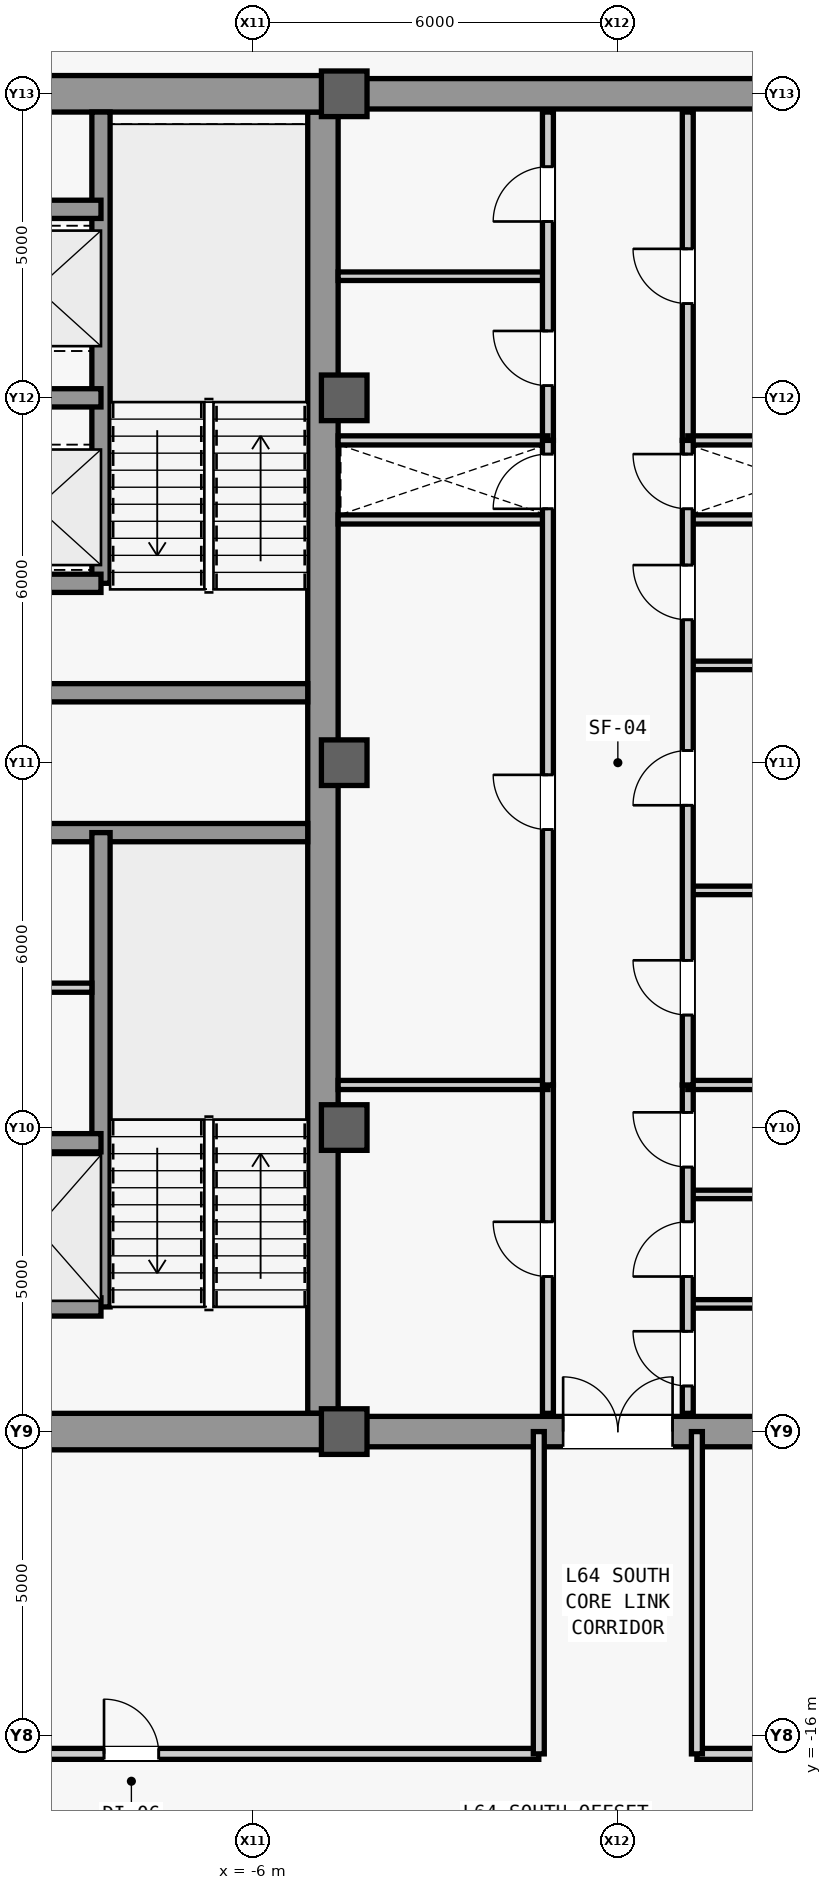
"""IFC4 building model, lengths in metres.
Left out: names, types, materials, properties, quantities, classifications, styles, units other than length and angle.
Written with IfcOpenShell. Run it as: python <this file> out.ifc"""

import sys

from ifc_helpers import new_model, si_unit, direction, frame, frame_2d, origin, origin_2d, place, context, subcontext, project, spatial, rectangle, extrude, source, transform, mapped, element, fill, save


model = new_model("IFC4")
c1 = context("Model", 3, precision=1e-05, world=origin(), true_north=direction((0.0, 1.0)))
c2 = subcontext(c1, "Body", "Model", "MODEL_VIEW")
j1 = project(units=[si_unit("LENGTHUNIT", "METRE"), si_unit("PLANEANGLEUNIT", "RADIAN")], contexts=[c1])
p1 = place(None, origin())
s1 = spatial("IfcSite", under=j1, at=p1, CompositionType="ELEMENT")
p2 = place(p1, origin())
s2 = spatial("IfcBuilding", under=s1, at=p2, CompositionType="ELEMENT")
p3 = place(p2, frame((0.0, 0.0, 273.5)))
s3 = spatial("IfcBuildingStorey", under=s2, at=p3, CompositionType="ELEMENT", Elevation=273.5)
m1 = source(origin(), c2, "Body", "SweptSolid", [
    extrude(rectangle(XDim=21.4, YDim=0.5, at=frame_2d((10.7, 0.0))), origin(), (0.0, 0.0, 1.0), 3.78),
])
p4 = place(p3, frame((-4.85, -10.7, 0.0), z_axis=(0.0, 0.0, 1.0), x_axis=(0.0, 1.0, 0.0)))
e1 = element("IfcWall", 1, at=p4, inside=s3, PredefinedType="SHEAR", context=c2, shape_type="MappedRepresentation", body=[
    mapped(m1, transform((0.0, 0.0, 0.0), scale=1.0)),
])
m2 = source(origin(), c2, "Body", "SweptSolid", [
    extrude(rectangle(XDim=5.9, YDim=0.6, at=frame_2d((2.95, 0.0))), origin(), (0.0, 0.0, 1.0), 3.78),
])
for number, where, z_axis, x_axis in (
    (2, (-10.75, -11.0, 0.0), (0.0, 0.0, 1.0), (1.0, 0.0, 0.0)),
    (3, (-10.75, 11.0, 0.0), (0.0, 0.0, 1.0), (1.0, 0.0, 0.0)),
):
    element("IfcWall", number, at=place(p3, frame(where, z_axis=z_axis, x_axis=x_axis)), inside=s3, PredefinedType="SHEAR", context=c2, shape_type="MappedRepresentation", body=[
        mapped(m2, transform((0.0, 0.0, 0.0), scale=1.0)),
    ])
m3 = source(origin(), c2, "Body", "SweptSolid", [
    extrude(rectangle(XDim=5.65, YDim=0.3, at=frame_2d((2.825, 0.0))), origin(), (0.0, 0.0, 1.0), 3.78),
])
for number, where, z_axis, x_axis in (
    (4, (-10.75, -1.15, 0.0), (0.0, 0.0, 1.0), (1.0, 0.0, 0.0)),
    (5, (-10.75, 1.15, 0.0), (0.0, 0.0, 1.0), (1.0, 0.0, 0.0)),
):
    element("IfcWall", number, at=place(p3, frame(where, z_axis=z_axis, x_axis=x_axis)), inside=s3, PredefinedType="SHEAR", context=c2, shape_type="MappedRepresentation", body=[
        mapped(m3, transform((0.0, 0.0, 0.0), scale=1.0)),
    ])
m4 = source(origin(), c2, "Body", "SweptSolid", [
    extrude(rectangle(XDim=9.2, YDim=0.5, at=frame_2d((4.6, 0.0))), origin(), (0.0, 0.0, 1.0), 3.78),
])
p5 = place(p3, frame((-4.6, -11.0, 0.0), z_axis=(0.0, 0.0, 1.0), x_axis=(1.0, 0.0, 0.0)))
e6 = element("IfcWall", 6, at=p5, inside=s3, PredefinedType="SHEAR", context=c2, shape_type="MappedRepresentation", body=[
    mapped(m4, transform((0.0, 0.0, 0.0), scale=1.0)),
])
m5 = source(origin(), c2, "Body", "SweptSolid", [
    extrude(rectangle(XDim=1.8, YDim=2.25, at=frame_2d((0.9, 1.125))), frame((0.0, 0.26, 0.0), z_axis=(0.0, -1.0, 0.0), x_axis=(1.0, 0.0, 0.0)), (0.0, 0.0, 1.0), 0.52),
])
p6 = place(p5, frame((3.7, 0.0, 0.0)))
e7 = element("IfcOpeningElement", 7, at=p6, cuts=e6, PredefinedType="OPENING", context=c2, shape_type="MappedRepresentation", body=[
    mapped(m5, transform((0.0, 0.0, 0.0), scale=1.0)),
])
p7 = place(p3, frame((-4.6, 11.0, 0.0), z_axis=(0.0, 0.0, 1.0), x_axis=(1.0, 0.0, 0.0)))
e8 = element("IfcWall", 8, at=p7, inside=s3, PredefinedType="SHEAR", context=c2, shape_type="MappedRepresentation", body=[
    mapped(m4, transform((0.0, 0.0, 0.0), scale=1.0)),
])
m6 = source(origin(), c2, "Body", "SweptSolid", [
    extrude(rectangle(XDim=0.75, YDim=0.75, at=origin_2d()), origin(), (0.0, 0.0, 1.0), 4.0),
])
for number, where, z_axis, x_axis in (
    (9, (-4.5, -11.0, 0.0), (0.0, 0.0, 1.0), (1.0, 0.0, 0.0)),
    (10, (-4.5, -6.0, 0.0), (0.0, 0.0, 1.0), (1.0, 0.0, 0.0)),
    (11, (-4.5, 0.0, 0.0), (0.0, 0.0, 1.0), (1.0, 0.0, 0.0)),
    (12, (-4.5, 6.0, 0.0), (0.0, 0.0, 1.0), (1.0, 0.0, 0.0)),
    (13, (-4.5, 11.0, 0.0), (0.0, 0.0, 1.0), (1.0, 0.0, 0.0)),
):
    element("IfcColumn", number, at=place(p3, frame(where, z_axis=z_axis, x_axis=x_axis)), inside=s3, PredefinedType="COLUMN", context=c2, shape_type="MappedRepresentation", body=[
        mapped(m6, transform((0.0, 0.0, 0.0), scale=1.0)),
    ])
m7 = source(origin(), c2, "Body", "SweptSolid", [
    extrude(rectangle(XDim=7.8, YDim=0.3, at=frame_2d((3.9, 0.0))), origin(), (0.0, 0.0, 1.0), 3.78),
])
p8 = place(p3, frame((-8.5, -8.95, 0.0), z_axis=(0.0, 0.0, 1.0), x_axis=(0.0, 1.0, 0.0)))
e14 = element("IfcWall", 14, at=p8, inside=s3, PredefinedType="SHEAR", context=c2, shape_type="MappedRepresentation", body=[
    mapped(m7, transform((0.0, 0.0, 0.0), scale=1.0)),
])
m8 = source(origin(), c2, "Body", "SweptSolid", [
    extrude(rectangle(XDim=2.2, YDim=0.3, at=frame_2d((1.1, 0.0))), origin(), (0.0, 0.0, 1.0), 3.78),
])
for number, where, z_axis, x_axis in (
    (15, (-10.7, -8.95, 0.0), (0.0, 0.0, 1.0), (1.0, 0.0, 0.0)),
    (16, (-10.7, -6.25, 0.0), (0.0, 0.0, 1.0), (1.0, 0.0, 0.0)),
):
    element("IfcWall", number, at=place(p3, frame(where, z_axis=z_axis, x_axis=x_axis)), inside=s3, PredefinedType="SHEAR", context=c2, shape_type="MappedRepresentation", body=[
        mapped(m8, transform((0.0, 0.0, 0.0), scale=1.0)),
    ])
m9 = source(origin(), c2, "Body", "SweptSolid", [
    extrude(rectangle(XDim=7.75, YDim=0.3, at=frame_2d((3.875, 0.0))), origin(), (0.0, 0.0, 1.0), 3.78),
])
p9 = place(p3, frame((-8.5, 2.95, 0.0), z_axis=(0.0, 0.0, 1.0), x_axis=(0.0, 1.0, 0.0)))
e17 = element("IfcWall", 17, at=p9, inside=s3, PredefinedType="SHEAR", context=c2, shape_type="MappedRepresentation", body=[
    mapped(m9, transform((0.0, 0.0, 0.0), scale=1.0)),
])
for number, where, z_axis, x_axis in (
    (18, (-10.7, 2.95, 0.0), (0.0, 0.0, 1.0), (1.0, 0.0, 0.0)),
    (19, (-10.7, 6.0, 0.0), (0.0, 0.0, 1.0), (1.0, 0.0, 0.0)),
    (20, (-10.7, 9.1, 0.0), (0.0, 0.0, 1.0), (1.0, 0.0, 0.0)),
):
    element("IfcWall", number, at=place(p3, frame(where, z_axis=z_axis, x_axis=x_axis)), inside=s3, PredefinedType="SHEAR", context=c2, shape_type="MappedRepresentation", body=[
        mapped(m8, transform((0.0, 0.0, 0.0), scale=1.0)),
    ])
m10 = source(origin(), c2, "Body", "SweptSolid", [
    extrude(rectangle(XDim=2.05, YDim=0.15, at=frame_2d((1.025, 0.0))), origin(), (0.0, 0.0, 1.0), 3.78),
])
p10 = place(p3, frame((-10.7, -3.7, 0.0), z_axis=(0.0, 0.0, 1.0), x_axis=(1.0, 0.0, 0.0)))
e21 = element("IfcWall", 21, at=p10, inside=s3, PredefinedType="PARTITIONING", context=c2, shape_type="MappedRepresentation", body=[
    mapped(m10, transform((0.0, 0.0, 0.0), scale=1.0)),
])
m11 = source(origin(), c2, "Body", "SweptSolid", [
    extrude(rectangle(XDim=3.45, YDim=0.15, at=frame_2d((1.725, 0.0))), origin(), (0.0, 0.0, 1.0), 3.78),
])
for number, where, z_axis, x_axis in (
    (22, (-4.6, 4.0, 0.0), (0.0, 0.0, 1.0), (1.0, 0.0, 0.0)),
    (23, (1.15, 4.0, 0.0), (0.0, 0.0, 1.0), (1.0, 0.0, 0.0)),
):
    element("IfcWall", number, at=place(p3, frame(where, z_axis=z_axis, x_axis=x_axis)), inside=s3, PredefinedType="PARTITIONING", context=c2, shape_type="MappedRepresentation", body=[
        mapped(m11, transform((0.0, 0.0, 0.0), scale=1.0)),
    ])
m12 = source(origin(), c2, "Body", "SweptSolid", [
    extrude(rectangle(XDim=5.4, YDim=0.18, at=frame_2d((2.7, 0.0))), origin(), (0.0, 0.0, 1.0), 3.78),
])
p11 = place(p3, frame((-1.15, -10.7, 0.0), z_axis=(0.0, 0.0, 1.0), x_axis=(0.0, 1.0, 0.0)))
e24 = element("IfcWall", 24, at=p11, inside=s3, PredefinedType="PARTITIONING", context=c2, shape_type="MappedRepresentation", body=[
    mapped(m12, transform((0.0, 0.0, 0.0), scale=1.0)),
])
m13 = source(origin(), c2, "Body", "SweptSolid", [
    extrude(rectangle(XDim=0.9, YDim=2.15, at=frame_2d((0.45, 1.075))), frame((0.0, 0.1, 0.0), z_axis=(0.0, -1.0, 0.0), x_axis=(1.0, 0.0, 0.0)), (0.0, 0.0, 1.0), 0.2),
])
p12 = place(p11, frame((2.25, 0.0, 0.0)))
e25 = element("IfcOpeningElement", 25, at=p12, cuts=e24, PredefinedType="OPENING", context=c2, shape_type="MappedRepresentation", body=[
    mapped(m13, transform((0.0, 0.0, 0.0), scale=1.0)),
])
m14 = source(origin(), c2, "Body", "SweptSolid", [
    extrude(rectangle(XDim=3.45, YDim=0.14, at=frame_2d((1.725, 0.0))), origin(), (0.0, 0.0, 1.0), 3.78),
])
for number, where, z_axis, x_axis in (
    (26, (1.15, -8.9, 0.0), (0.0, 0.0, 1.0), (1.0, 0.0, 0.0)),
    (27, (1.15, -7.1, 0.0), (0.0, 0.0, 1.0), (1.0, 0.0, 0.0)),
):
    element("IfcWall", number, at=place(p3, frame(where, z_axis=z_axis, x_axis=x_axis)), inside=s3, PredefinedType="PARTITIONING", context=c2, shape_type="MappedRepresentation", body=[
        mapped(m14, transform((0.0, 0.0, 0.0), scale=1.0)),
    ])
p13 = place(p3, frame((1.15, -10.7, 0.0), z_axis=(0.0, 0.0, 1.0), x_axis=(0.0, 1.0, 0.0)))
e28 = element("IfcWall", 28, at=p13, inside=s3, PredefinedType="PARTITIONING", context=c2, shape_type="MappedRepresentation", body=[
    mapped(m12, transform((0.0, 0.0, 0.0), scale=1.0)),
])
p14 = place(p13, frame((0.45, 0.0, 0.0)))
e29 = element("IfcOpeningElement", 29, at=p14, cuts=e28, PredefinedType="OPENING", context=c2, shape_type="MappedRepresentation", body=[
    mapped(m13, transform((0.0, 0.0, 0.0), scale=1.0)),
])
p15 = place(p13, frame((2.25, 0.0, 0.0)))
e30 = element("IfcOpeningElement", 30, at=p15, cuts=e28, PredefinedType="OPENING", context=c2, shape_type="MappedRepresentation", body=[
    mapped(m13, transform((0.0, 0.0, 0.0), scale=1.0)),
])
p16 = place(p13, frame((4.05, 0.0, 0.0)))
e31 = element("IfcOpeningElement", 31, at=p16, cuts=e28, PredefinedType="OPENING", context=c2, shape_type="MappedRepresentation", body=[
    mapped(m13, transform((0.0, 0.0, 0.0), scale=1.0)),
])
for number, where, z_axis, x_axis in (
    (32, (-4.6, -5.3, 0.0), (0.0, 0.0, 1.0), (1.0, 0.0, 0.0)),
    (33, (1.15, -5.3, 0.0), (0.0, 0.0, 1.0), (1.0, 0.0, 0.0)),
):
    element("IfcWall", number, at=place(p3, frame(where, z_axis=z_axis, x_axis=x_axis)), inside=s3, PredefinedType="PARTITIONING", context=c2, shape_type="MappedRepresentation", body=[
        mapped(m11, transform((0.0, 0.0, 0.0), scale=1.0)),
    ])
p17 = place(p3, frame((-4.6, 8.0, 0.0), z_axis=(0.0, 0.0, 1.0), x_axis=(1.0, 0.0, 0.0)))
e34 = element("IfcWall", 34, at=p17, inside=s3, PredefinedType="PARTITIONING", context=c2, shape_type="MappedRepresentation", body=[
    mapped(m14, transform((0.0, 0.0, 0.0), scale=1.0)),
])
p18 = place(p3, frame((-1.15, 5.3, 0.0), z_axis=(0.0, 0.0, 1.0), x_axis=(0.0, 1.0, 0.0)))
e35 = element("IfcWall", 35, at=p18, inside=s3, PredefinedType="PARTITIONING", context=c2, shape_type="MappedRepresentation", body=[
    mapped(m12, transform((0.0, 0.0, 0.0), scale=1.0)),
])
p19 = place(p18, frame((0.9, 0.0, 0.0)))
e36 = element("IfcOpeningElement", 36, at=p19, cuts=e35, PredefinedType="OPENING", context=c2, shape_type="MappedRepresentation", body=[
    mapped(m13, transform((0.0, 0.0, 0.0), scale=1.0)),
])
p20 = place(p18, frame((3.6, 0.0, 0.0)))
e37 = element("IfcOpeningElement", 37, at=p20, cuts=e35, PredefinedType="OPENING", context=c2, shape_type="MappedRepresentation", body=[
    mapped(m13, transform((0.0, 0.0, 0.0), scale=1.0)),
])
p21 = place(p3, frame((1.15, 5.3, 0.0), z_axis=(0.0, 0.0, 1.0), x_axis=(0.0, 1.0, 0.0)))
e38 = element("IfcWall", 38, at=p21, inside=s3, PredefinedType="PARTITIONING", context=c2, shape_type="MappedRepresentation", body=[
    mapped(m12, transform((0.0, 0.0, 0.0), scale=1.0)),
])
p22 = place(p21, frame((2.25, 0.0, 0.0)))
e39 = element("IfcOpeningElement", 39, at=p22, cuts=e38, PredefinedType="OPENING", context=c2, shape_type="MappedRepresentation", body=[
    mapped(m13, transform((0.0, 0.0, 0.0), scale=1.0)),
])
for number, where, z_axis, x_axis in (
    (40, (-4.6, 5.3, 0.0), (0.0, 0.0, 1.0), (1.0, 0.0, 0.0)),
    (41, (1.15, 5.3, 0.0), (0.0, 0.0, 1.0), (1.0, 0.0, 0.0)),
):
    element("IfcWall", number, at=place(p3, frame(where, z_axis=z_axis, x_axis=x_axis)), inside=s3, PredefinedType="PARTITIONING", context=c2, shape_type="MappedRepresentation", body=[
        mapped(m11, transform((0.0, 0.0, 0.0), scale=1.0)),
    ])
m15 = source(origin(), c2, "Body", "SweptSolid", [
    extrude(rectangle(XDim=10.6, YDim=0.18, at=frame_2d((5.3, 0.0))), origin(), (0.0, 0.0, 1.0), 3.78),
])
p23 = place(p3, frame((-1.15, -5.3, 0.0), z_axis=(0.0, 0.0, 1.0), x_axis=(0.0, 1.0, 0.0)))
e42 = element("IfcWall", 42, at=p23, inside=s3, PredefinedType="PARTITIONING", context=c2, shape_type="MappedRepresentation", body=[
    mapped(m15, transform((0.0, 0.0, 0.0), scale=1.0)),
])
p24 = place(p23, frame((4.2, 0.0, 0.0)))
e43 = element("IfcOpeningElement", 43, at=p24, cuts=e42, PredefinedType="OPENING", context=c2, shape_type="MappedRepresentation", body=[
    mapped(m13, transform((0.0, 0.0, 0.0), scale=1.0)),
])
p25 = place(p23, frame((9.475, 0.0, 0.0)))
e44 = element("IfcOpeningElement", 44, at=p25, cuts=e42, PredefinedType="OPENING", context=c2, shape_type="MappedRepresentation", body=[
    mapped(m13, transform((0.0, 0.0, 0.0), scale=1.0)),
])
for number, where, z_axis, x_axis in (
    (45, (1.15, -2.1, 0.0), (0.0, 0.0, 1.0), (1.0, 0.0, 0.0)),
    (46, (1.15, 1.6, 0.0), (0.0, 0.0, 1.0), (1.0, 0.0, 0.0)),
):
    element("IfcWall", number, at=place(p3, frame(where, z_axis=z_axis, x_axis=x_axis)), inside=s3, PredefinedType="PARTITIONING", context=c2, shape_type="MappedRepresentation", body=[
        mapped(m14, transform((0.0, 0.0, 0.0), scale=1.0)),
    ])
p26 = place(p3, frame((1.15, -5.3, 0.0), z_axis=(0.0, 0.0, 1.0), x_axis=(0.0, 1.0, 0.0)))
e47 = element("IfcWall", 47, at=p26, inside=s3, PredefinedType="PARTITIONING", context=c2, shape_type="MappedRepresentation", body=[
    mapped(m15, transform((0.0, 0.0, 0.0), scale=1.0)),
])
p27 = place(p26, frame((1.15, 0.0, 0.0)))
e48 = element("IfcOpeningElement", 48, at=p27, cuts=e47, PredefinedType="OPENING", context=c2, shape_type="MappedRepresentation", body=[
    mapped(m13, transform((0.0, 0.0, 0.0), scale=1.0)),
])
p28 = place(p26, frame((4.6, 0.0, 0.0)))
e49 = element("IfcOpeningElement", 49, at=p28, cuts=e47, PredefinedType="OPENING", context=c2, shape_type="MappedRepresentation", body=[
    mapped(m13, transform((0.0, 0.0, 0.0), scale=1.0)),
])
p29 = place(p26, frame((7.65, 0.0, 0.0)))
e50 = element("IfcOpeningElement", 50, at=p29, cuts=e47, PredefinedType="OPENING", context=c2, shape_type="MappedRepresentation", body=[
    mapped(m13, transform((0.0, 0.0, 0.0), scale=1.0)),
])
p30 = place(p26, frame((9.475, 0.0, 0.0)))
e51 = element("IfcOpeningElement", 51, at=p30, cuts=e47, PredefinedType="OPENING", context=c2, shape_type="MappedRepresentation", body=[
    mapped(m13, transform((0.0, 0.0, 0.0), scale=1.0)),
])
m16 = source(origin(), c2, "Body", "SweptSolid", [
    extrude(rectangle(XDim=16.1, YDim=0.18, at=frame_2d((8.05, 0.0))), origin(), (0.0, 0.0, 1.0), 3.78),
])
p31 = place(p3, frame((-17.4, -16.3, 0.0), z_axis=(0.0, 0.0, 1.0), x_axis=(1.0, 0.0, 0.0)))
e52 = element("IfcWall", 52, at=p31, inside=s3, PredefinedType="PARTITIONING", context=c2, shape_type="MappedRepresentation", body=[
    mapped(m16, transform((0.0, 0.0, 0.0), scale=1.0)),
])
p32 = place(p31, frame((8.95, 0.0, 0.0)))
e53 = element("IfcOpeningElement", 53, at=p32, cuts=e52, PredefinedType="OPENING", context=c2, shape_type="MappedRepresentation", body=[
    mapped(m13, transform((0.0, 0.0, 0.0), scale=1.0)),
])
m17 = source(origin(), c2, "Body", "SweptSolid", [
    extrude(rectangle(XDim=5.3, YDim=0.18, at=frame_2d((2.65, 0.0))), origin(), (0.0, 0.0, 1.0), 3.78),
])
p33 = place(p3, frame((-1.3, -16.3, 0.0), z_axis=(0.0, 0.0, 1.0), x_axis=(0.0, 1.0, 0.0)))
e54 = element("IfcWall", 54, at=p33, inside=s3, PredefinedType="PARTITIONING", context=c2, shape_type="MappedRepresentation", body=[
    mapped(m17, transform((0.0, 0.0, 0.0), scale=1.0)),
])
m18 = source(origin(), c2, "Body", "SweptSolid", [
    extrude(rectangle(XDim=14.05, YDim=0.18, at=frame_2d((7.025, 0.0))), origin(), (0.0, 0.0, 1.0), 3.78),
])
p34 = place(p3, frame((1.3, -16.3, 0.0), z_axis=(0.0, 0.0, 1.0), x_axis=(1.0, 0.0, 0.0)))
e55 = element("IfcWall", 55, at=p34, inside=s3, PredefinedType="PARTITIONING", context=c2, shape_type="MappedRepresentation", body=[
    mapped(m18, transform((0.0, 0.0, 0.0), scale=1.0)),
])
p35 = place(p34, frame((6.25, 0.0, 0.0)))
e56 = element("IfcOpeningElement", 56, at=p35, cuts=e55, PredefinedType="OPENING", context=c2, shape_type="MappedRepresentation", body=[
    mapped(m13, transform((0.0, 0.0, 0.0), scale=1.0)),
])
p36 = place(p3, frame((1.3, -16.3, 0.0), z_axis=(0.0, 0.0, 1.0), x_axis=(0.0, 1.0, 0.0)))
e57 = element("IfcWall", 57, at=p36, inside=s3, PredefinedType="PARTITIONING", context=c2, shape_type="MappedRepresentation", body=[
    mapped(m17, transform((0.0, 0.0, 0.0), scale=1.0)),
])
m19 = source(origin(), c2, "Body", "SweptSolid", [
    extrude(rectangle(XDim=0.9, YDim=2.15, at=frame_2d((0.45, 1.075))), frame((0.0, 0.025, 0.0), z_axis=(0.0, -1.0, 0.0), x_axis=(1.0, 0.0, 0.0)), (0.0, 0.0, 1.0), 0.05),
])
p37 = place(p12, origin())
e58 = element("IfcDoor", 58, at=p37, inside=s3, OperationType="SINGLE_SWING_RIGHT", PredefinedType="DOOR", context=c2, shape_type="MappedRepresentation", body=[
    mapped(m19, transform((0.0, 0.0, 0.0), scale=1.0)),
])
fill(e25, e58)
p38 = place(p14, origin())
e59 = element("IfcDoor", 59, at=p38, inside=s3, OperationType="SINGLE_SWING_RIGHT", PredefinedType="DOOR", context=c2, shape_type="MappedRepresentation", body=[
    mapped(m19, transform((0.0, 0.0, 0.0), scale=1.0)),
])
fill(e29, e59)
p39 = place(p15, origin())
e60 = element("IfcDoor", 60, at=p39, inside=s3, OperationType="SINGLE_SWING_LEFT", PredefinedType="DOOR", context=c2, shape_type="MappedRepresentation", body=[
    mapped(m19, transform((0.0, 0.0, 0.0), scale=1.0)),
])
fill(e30, e60)
p40 = place(p16, origin())
e61 = element("IfcDoor", 61, at=p40, inside=s3, OperationType="SINGLE_SWING_RIGHT", PredefinedType="DOOR", context=c2, shape_type="MappedRepresentation", body=[
    mapped(m19, transform((0.0, 0.0, 0.0), scale=1.0)),
])
fill(e31, e61)
m20 = source(origin(), c2, "Body", "SweptSolid", [
    extrude(rectangle(XDim=1.8, YDim=2.25, at=frame_2d((0.9, 1.125))), frame((0.0, 0.025, 0.0), z_axis=(0.0, -1.0, 0.0), x_axis=(1.0, 0.0, 0.0)), (0.0, 0.0, 1.0), 0.05),
])
p41 = place(p6, origin())
e62 = element("IfcDoor", 62, at=p41, inside=s3, OperationType="SINGLE_SWING_LEFT", PredefinedType="DOOR", context=c2, shape_type="MappedRepresentation", body=[
    mapped(m20, transform((0.0, 0.0, 0.0), scale=1.0)),
])
fill(e7, e62)
p42 = place(p19, origin())
e63 = element("IfcDoor", 63, at=p42, inside=s3, OperationType="SINGLE_SWING_RIGHT", PredefinedType="DOOR", context=c2, shape_type="MappedRepresentation", body=[
    mapped(m19, transform((0.0, 0.0, 0.0), scale=1.0)),
])
fill(e36, e63)
p43 = place(p20, origin())
e64 = element("IfcDoor", 64, at=p43, inside=s3, OperationType="SINGLE_SWING_LEFT", PredefinedType="DOOR", context=c2, shape_type="MappedRepresentation", body=[
    mapped(m19, transform((0.0, 0.0, 0.0), scale=1.0)),
])
fill(e37, e64)
p44 = place(p22, origin())
e65 = element("IfcDoor", 65, at=p44, inside=s3, OperationType="SINGLE_SWING_RIGHT", PredefinedType="DOOR", context=c2, shape_type="MappedRepresentation", body=[
    mapped(m19, transform((0.0, 0.0, 0.0), scale=1.0)),
])
fill(e39, e65)
p45 = place(p24, origin())
e66 = element("IfcDoor", 66, at=p45, inside=s3, OperationType="SINGLE_SWING_RIGHT", PredefinedType="DOOR", context=c2, shape_type="MappedRepresentation", body=[
    mapped(m19, transform((0.0, 0.0, 0.0), scale=1.0)),
])
fill(e43, e66)
p46 = place(p27, origin())
e67 = element("IfcDoor", 67, at=p46, inside=s3, OperationType="SINGLE_SWING_RIGHT", PredefinedType="DOOR", context=c2, shape_type="MappedRepresentation", body=[
    mapped(m19, transform((0.0, 0.0, 0.0), scale=1.0)),
])
fill(e48, e67)
p47 = place(p28, origin())
e68 = element("IfcDoor", 68, at=p47, inside=s3, OperationType="SINGLE_SWING_LEFT", PredefinedType="DOOR", context=c2, shape_type="MappedRepresentation", body=[
    mapped(m19, transform((0.0, 0.0, 0.0), scale=1.0)),
])
fill(e49, e68)
p48 = place(p29, origin())
e69 = element("IfcDoor", 69, at=p48, inside=s3, OperationType="SINGLE_SWING_RIGHT", PredefinedType="DOOR", context=c2, shape_type="MappedRepresentation", body=[
    mapped(m19, transform((0.0, 0.0, 0.0), scale=1.0)),
])
fill(e50, e69)
p49 = place(p25, origin())
e70 = element("IfcDoor", 70, at=p49, inside=s3, OperationType="SINGLE_SWING_LEFT", PredefinedType="DOOR", context=c2, shape_type="MappedRepresentation", body=[
    mapped(m19, transform((0.0, 0.0, 0.0), scale=1.0)),
])
fill(e44, e70)
p50 = place(p30, origin())
e71 = element("IfcDoor", 71, at=p50, inside=s3, OperationType="SINGLE_SWING_RIGHT", PredefinedType="DOOR", context=c2, shape_type="MappedRepresentation", body=[
    mapped(m19, transform((0.0, 0.0, 0.0), scale=1.0)),
])
fill(e51, e71)
p51 = place(p32, origin())
e72 = element("IfcDoor", 72, at=p51, inside=s3, OperationType="SINGLE_SWING_LEFT", PredefinedType="DOOR", context=c2, shape_type="MappedRepresentation", body=[
    mapped(m19, transform((0.0, 0.0, 0.0), scale=1.0)),
])
fill(e53, e72)
save(model, sys.argv[1])
